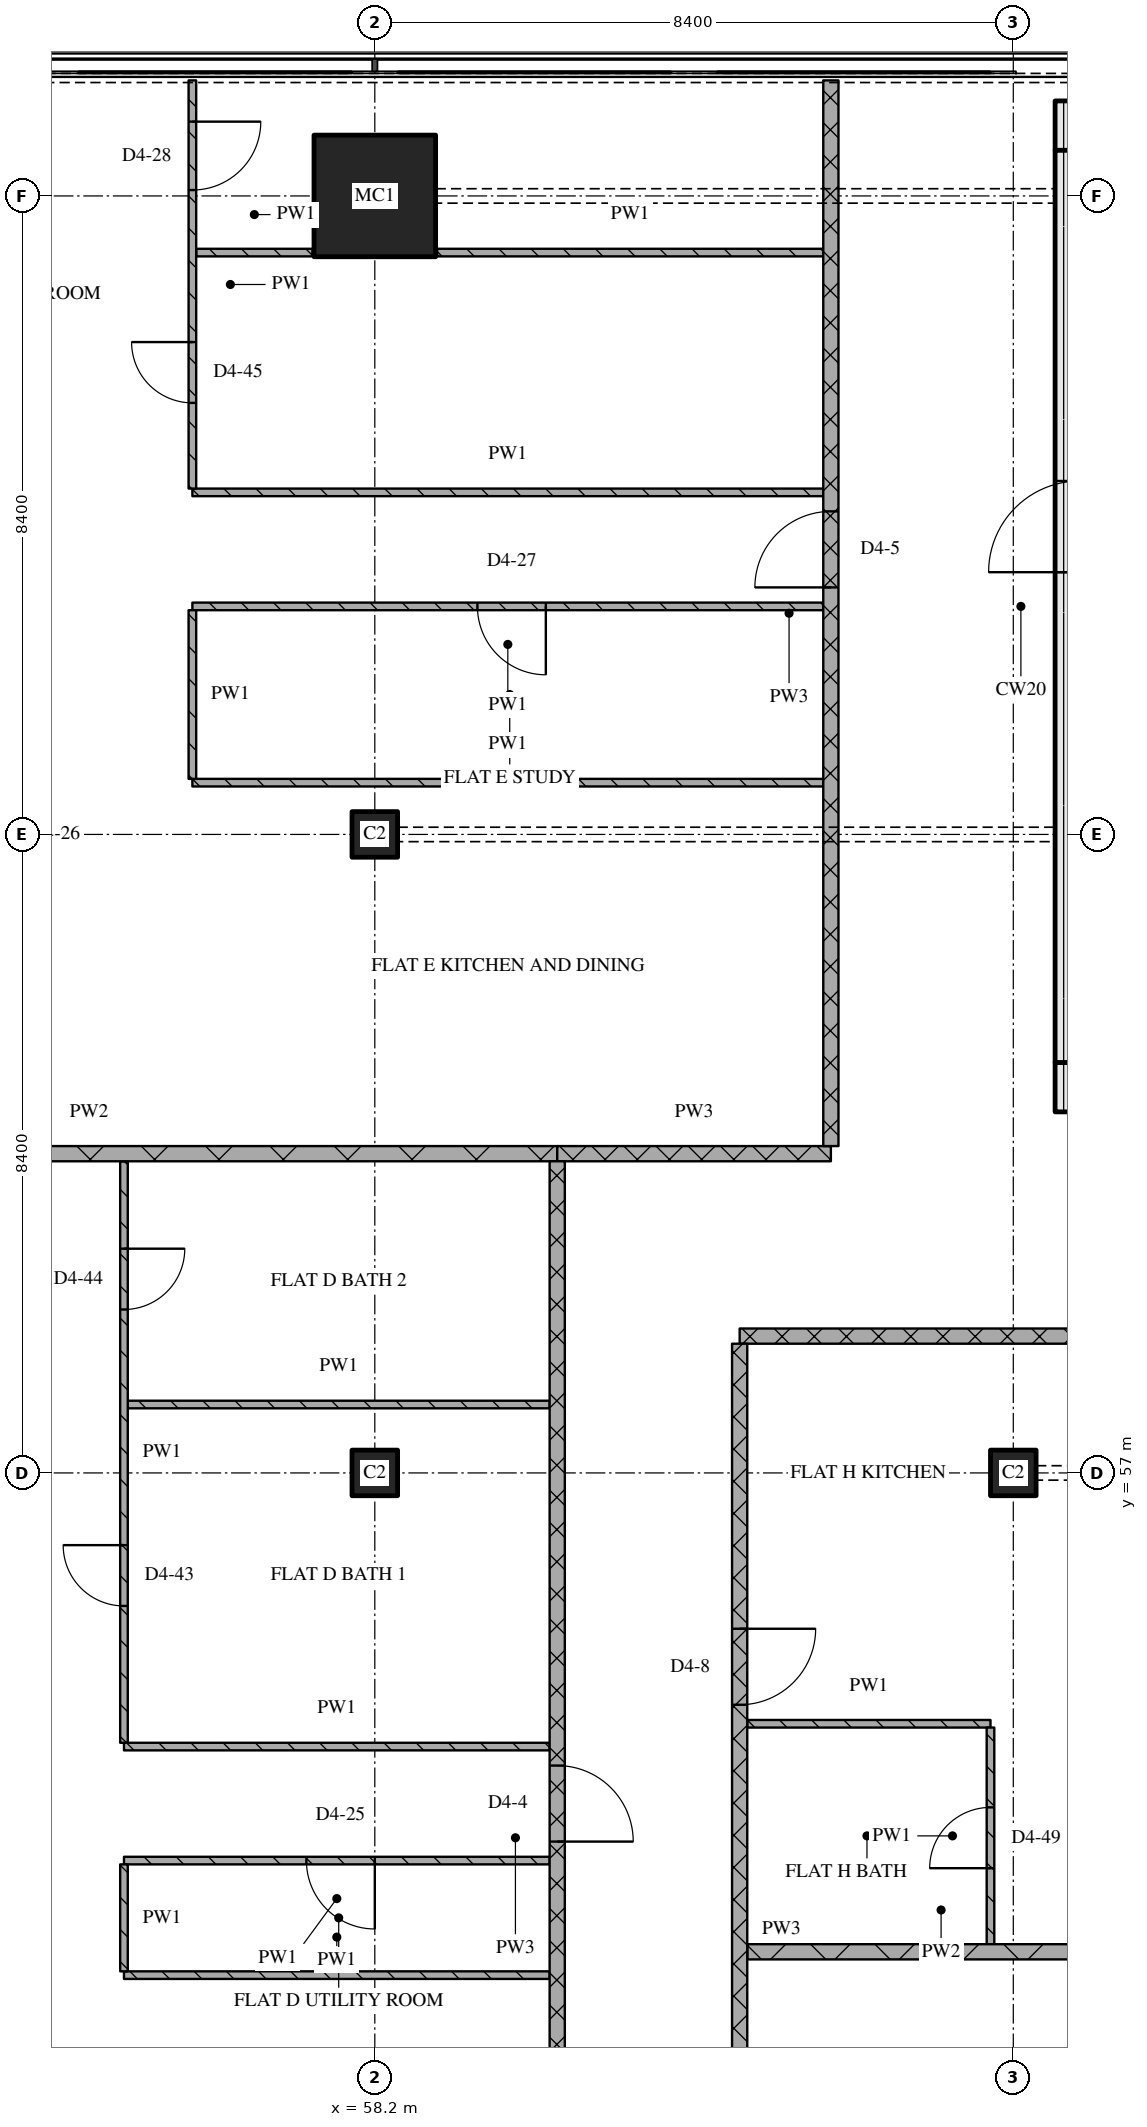
"""IFC4 building model, lengths in metres.
Left out: names, types, materials, properties, quantities, classifications, styles, units other than length and angle.
Written with IfcOpenShell. Run it as: python <this file> out.ifc"""

import sys

from ifc_helpers import new_model, si_unit, direction, frame, frame_2d, origin, origin_2d, place, context, subcontext, project, spatial, rectangle, extrude, element, fill, save


model = new_model("IFC4")
c1 = context("Model", 3, precision=1e-05, world=origin(), true_north=direction((0.0, 1.0)))
c2 = subcontext(c1, "Body", "Model", "MODEL_VIEW")
j1 = project(units=[si_unit("LENGTHUNIT", "METRE"), si_unit("PLANEANGLEUNIT", "RADIAN")], contexts=[c1])
p1 = place(None, origin())
s1 = spatial("IfcSite", under=j1, at=p1, CompositionType="ELEMENT")
p2 = place(p1, origin())
s2 = spatial("IfcBuilding", under=s1, at=p2, CompositionType="ELEMENT")
p3 = place(p2, frame((0.0, 0.0, 245.1)))
s3 = spatial("IfcBuildingStorey", under=s2, at=p3, CompositionType="ELEMENT", Elevation=245.1)
for number, where, z_axis, x_axis in (
    (1, (58.2, 57.0, 0.0), (0.0, 0.0, 1.0), (1.0, 0.0, 0.0)),
    (2, (58.2, 65.4, 0.0), (0.0, 0.0, 1.0), (1.0, 0.0, 0.0)),
):
    element("IfcColumn", number, at=place(p3, frame(where, z_axis=z_axis, x_axis=x_axis)), inside=s3, PredefinedType="COLUMN", context=c2, shape_type="SweptSolid", body=[
        extrude(rectangle(XDim=0.6, YDim=0.6, at=origin_2d()), origin(), (0.0, 0.0, 1.0), 3.6),
    ])
p4 = place(p3, frame((58.2, 73.8, 0.0), z_axis=(0.0, 0.0, 1.0), x_axis=(1.0, 0.0, 0.0)))
e3 = element("IfcColumn", 3, at=p4, inside=s3, PredefinedType="COLUMN", context=c2, shape_type="SweptSolid", body=[
    extrude(rectangle(XDim=1.6, YDim=1.6, at=origin_2d()), origin(), (0.0, 0.0, 1.0), 3.6),
])
p5 = place(p3, frame((66.6, 57.0, 0.0), z_axis=(0.0, 0.0, 1.0), x_axis=(1.0, 0.0, 0.0)))
e4 = element("IfcColumn", 4, at=p5, inside=s3, PredefinedType="COLUMN", context=c2, shape_type="SweptSolid", body=[
    extrude(rectangle(XDim=0.6, YDim=0.6, at=origin_2d()), origin(), (0.0, 0.0, 1.0), 3.6),
])
p6 = place(p3, frame((67.15, 62.075, 0.0), z_axis=(0.0, 0.0, 1.0), x_axis=(1.0, 0.0, 0.0)))
e5 = element("IfcWall", 5, at=p6, inside=s3, PredefinedType="SOLIDWALL", context=c2, shape_type="SweptSolid", body=[
    extrude(rectangle(XDim=40.9, YDim=0.65, at=frame_2d((20.45, 0.0))), origin(), (0.0, 0.0, 1.0), 3.32),
])
p7 = place(p6, frame((20.8, 0.0, 0.0)))
e6 = element("IfcOpeningElement", 6, at=p7, cuts=e5, PredefinedType="OPENING", context=c2, shape_type="SweptSolid", body=[
    extrude(rectangle(XDim=1.8, YDim=2.1, at=frame_2d((0.9, 1.05))), frame((0.0, 0.335, 0.0), z_axis=(0.0, -1.0, 0.0), x_axis=(1.0, 0.0, 0.0)), (0.0, 0.0, 1.0), 0.67),
])
p8 = place(p3, frame((67.15, 74.725, 0.0), z_axis=(0.0, 0.0, 1.0), x_axis=(1.0, 0.0, 0.0)))
e7 = element("IfcWall", 7, at=p8, inside=s3, PredefinedType="SOLIDWALL", context=c2, shape_type="SweptSolid", body=[
    extrude(rectangle(XDim=40.9, YDim=0.65, at=frame_2d((20.45, 0.0))), origin(), (0.0, 0.0, 1.0), 3.32),
])
p9 = place(p3, frame((67.475, 62.4, 0.0), z_axis=(0.0, 0.0, 1.0), x_axis=(0.0, 1.0, 0.0)))
e8 = element("IfcWall", 8, at=p9, inside=s3, PredefinedType="SOLIDWALL", context=c2, shape_type="SweptSolid", body=[
    extrude(rectangle(XDim=12.0, YDim=0.65, at=frame_2d((6.0, 0.0))), origin(), (0.0, 0.0, 1.0), 3.32),
])
p10 = place(p9, frame((6.45, 0.0, 0.0)))
e9 = element("IfcOpeningElement", 9, at=p10, cuts=e8, PredefinedType="OPENING", context=c2, shape_type="SweptSolid", body=[
    extrude(rectangle(XDim=1.2, YDim=2.1, at=frame_2d((0.6, 1.05))), frame((0.0, 0.335, 0.0), z_axis=(0.0, -1.0, 0.0), x_axis=(1.0, 0.0, 0.0)), (0.0, 0.0, 1.0), 0.67),
])
p11 = place(p3, frame((54.9, 50.393, 0.0), z_axis=(0.0, 0.0, 1.0), x_axis=(1.0, 0.0, 0.0)))
e10 = element("IfcWall", 10, at=p11, inside=s3, PredefinedType="PARTITIONING", context=c2, shape_type="SweptSolid", body=[
    extrude(rectangle(XDim=5.6, YDim=0.1, at=frame_2d((2.8, 0.0))), origin(), (0.0, 0.0, 1.0), 3.32),
])
p12 = place(p3, frame((63.1, 50.7, 0.0), z_axis=(0.0, 0.0, 1.0), x_axis=(1.0, 0.0, 0.0)))
e11 = element("IfcWall", 11, at=p12, inside=s3, PredefinedType="PARTITIONING", context=c2, shape_type="SweptSolid", body=[
    extrude(rectangle(XDim=5.1, YDim=0.2, at=frame_2d((2.55, 0.0))), origin(), (0.0, 0.0, 1.0), 3.32),
])
p13 = place(p3, frame((60.5, 51.9, 0.0), z_axis=(0.0, 0.0, 1.0), x_axis=(-1.0, 0.0, 0.0)))
e12 = element("IfcWall", 12, at=p13, inside=s3, PredefinedType="PARTITIONING", context=c2, shape_type="SweptSolid", body=[
    extrude(rectangle(XDim=5.6, YDim=0.1, at=frame_2d((2.8, 0.0))), origin(), (0.0, 0.0, 1.0), 3.32),
])
p14 = place(p13, frame((2.3, 0.0, 0.0)))
e13 = element("IfcOpeningElement", 13, at=p14, cuts=e12, PredefinedType="OPENING", context=c2, shape_type="SweptSolid", body=[
    extrude(rectangle(XDim=0.9, YDim=2.1, at=frame_2d((0.45, 1.05))), frame((0.0, 0.06, 0.0), z_axis=(0.0, -1.0, 0.0), x_axis=(1.0, 0.0, 0.0)), (0.0, 0.0, 1.0), 0.12),
])
p15 = place(p3, frame((54.9, 53.4, 0.0), z_axis=(0.0, 0.0, 1.0), x_axis=(1.0, 0.0, 0.0)))
e14 = element("IfcWall", 14, at=p15, inside=s3, PredefinedType="PARTITIONING", context=c2, shape_type="SweptSolid", body=[
    extrude(rectangle(XDim=5.6, YDim=0.1, at=frame_2d((2.8, 0.0))), origin(), (0.0, 0.0, 1.0), 3.32),
])
p16 = place(p3, frame((63.1, 53.7, 0.0), z_axis=(0.0, 0.0, 1.0), x_axis=(1.0, 0.0, 0.0)))
e15 = element("IfcWall", 15, at=p16, inside=s3, PredefinedType="PARTITIONING", context=c2, shape_type="SweptSolid", body=[
    extrude(rectangle(XDim=3.2, YDim=0.1, at=frame_2d((1.6, 0.0))), origin(), (0.0, 0.0, 1.0), 3.32),
])
p17 = place(p3, frame((54.95, 57.9, 0.0), z_axis=(0.0, 0.0, 1.0), x_axis=(1.0, 0.0, 0.0)))
e16 = element("IfcWall", 16, at=p17, inside=s3, PredefinedType="PARTITIONING", context=c2, shape_type="SweptSolid", body=[
    extrude(rectangle(XDim=5.55, YDim=0.1, at=frame_2d((2.775, 0.0))), origin(), (0.0, 0.0, 1.0), 3.32),
])
p18 = place(p3, frame((63.0, 58.8, 0.0), z_axis=(0.0, 0.0, 1.0), x_axis=(1.0, 0.0, 0.0)))
e17 = element("IfcWall", 17, at=p18, inside=s3, PredefinedType="PARTITIONING", context=c2, shape_type="SweptSolid", body=[
    extrude(rectangle(XDim=10.8, YDim=0.2, at=frame_2d((5.4, 0.0))), origin(), (0.0, 0.0, 1.0), 3.32),
])
p19 = place(p3, frame((60.6, 61.2, 0.0), z_axis=(0.0, 0.0, 1.0), x_axis=(1.0, 0.0, 0.0)))
e18 = element("IfcWall", 18, at=p19, inside=s3, PredefinedType="PARTITIONING", context=c2, shape_type="SweptSolid", body=[
    extrude(rectangle(XDim=3.6, YDim=0.2, at=frame_2d((1.8, 0.0))), origin(), (0.0, 0.0, 1.0), 3.32),
])
p20 = place(p3, frame((48.28, 61.2, 0.0), z_axis=(0.0, 0.0, 1.0), x_axis=(1.0, 0.0, 0.0)))
e19 = element("IfcWall", 19, at=p20, inside=s3, PredefinedType="PARTITIONING", context=c2, shape_type="SweptSolid", body=[
    extrude(rectangle(XDim=12.32, YDim=0.2, at=frame_2d((6.16, 0.0))), origin(), (0.0, 0.0, 1.0), 3.32),
])
p21 = place(p3, frame((55.8, 66.081, 0.0), z_axis=(0.0, 0.0, 1.0), x_axis=(1.0, 0.0, 0.0)))
e20 = element("IfcWall", 20, at=p21, inside=s3, PredefinedType="PARTITIONING", context=c2, shape_type="SweptSolid", body=[
    extrude(rectangle(XDim=8.3, YDim=0.1, at=frame_2d((4.15, 0.0))), origin(), (0.0, 0.0, 1.0), 3.32),
])
p22 = place(p3, frame((64.1, 68.4, 0.0), z_axis=(0.0, 0.0, 1.0), x_axis=(-1.0, 0.0, 0.0)))
e21 = element("IfcWall", 21, at=p22, inside=s3, PredefinedType="PARTITIONING", context=c2, shape_type="SweptSolid", body=[
    extrude(rectangle(XDim=8.3, YDim=0.1, at=frame_2d((4.15, 0.0))), origin(), (0.0, 0.0, 1.0), 3.32),
])
p23 = place(p22, frame((3.65, 0.0, 0.0)))
e22 = element("IfcOpeningElement", 22, at=p23, cuts=e21, PredefinedType="OPENING", context=c2, shape_type="SweptSolid", body=[
    extrude(rectangle(XDim=0.9, YDim=2.1, at=frame_2d((0.45, 1.05))), frame((0.0, 0.06, 0.0), z_axis=(0.0, -1.0, 0.0), x_axis=(1.0, 0.0, 0.0)), (0.0, 0.0, 1.0), 0.12),
])
p24 = place(p3, frame((55.8, 69.9, 0.0), z_axis=(0.0, 0.0, 1.0), x_axis=(1.0, 0.0, 0.0)))
e23 = element("IfcWall", 23, at=p24, inside=s3, PredefinedType="PARTITIONING", context=c2, shape_type="SweptSolid", body=[
    extrude(rectangle(XDim=8.3, YDim=0.1, at=frame_2d((4.15, 0.0))), origin(), (0.0, 0.0, 1.0), 3.32),
])
p25 = place(p3, frame((55.85, 73.055, 0.0), z_axis=(0.0, 0.0, 1.0), x_axis=(1.0, 0.0, 0.0)))
e24 = element("IfcWall", 24, at=p25, inside=s3, PredefinedType="PARTITIONING", context=c2, shape_type="SweptSolid", body=[
    extrude(rectangle(XDim=1.53, YDim=0.1, at=frame_2d((0.765, 0.0))), origin(), (0.0, 0.0, 1.0), 3.32),
])
p26 = place(p3, frame((59.02, 73.055, 0.0), z_axis=(0.0, 0.0, 1.0), x_axis=(1.0, 0.0, 0.0)))
e25 = element("IfcWall", 25, at=p26, inside=s3, PredefinedType="PARTITIONING", context=c2, shape_type="SweptSolid", body=[
    extrude(rectangle(XDim=5.08, YDim=0.1, at=frame_2d((2.54, 0.0))), origin(), (0.0, 0.0, 1.0), 3.32),
])
p27 = place(p3, frame((54.9, 51.85, 0.0), z_axis=(0.0, 0.0, 1.0), x_axis=(0.0, -1.0, 0.0)))
e26 = element("IfcWall", 26, at=p27, inside=s3, PredefinedType="PARTITIONING", context=c2, shape_type="SweptSolid", body=[
    extrude(rectangle(XDim=1.407, YDim=0.1, at=frame_2d((0.704, 0.0))), origin(), (0.0, 0.0, 1.0), 3.32),
])
p28 = place(p3, frame((54.9, 61.1, 0.0), z_axis=(0.0, 0.0, 1.0), x_axis=(0.0, -1.0, 0.0)))
e27 = element("IfcWall", 27, at=p28, inside=s3, PredefinedType="PARTITIONING", context=c2, shape_type="SweptSolid", body=[
    extrude(rectangle(XDim=7.65, YDim=0.1, at=frame_2d((3.825, 0.0))), origin(), (0.0, 0.0, 1.0), 3.32),
])
p29 = place(p28, frame((1.15, 0.0, 0.0)))
e28 = element("IfcOpeningElement", 28, at=p29, cuts=e27, PredefinedType="OPENING", context=c2, shape_type="SweptSolid", body=[
    extrude(rectangle(XDim=0.8, YDim=2.1, at=frame_2d((0.4, 1.05))), frame((0.0, 0.06, 0.0), z_axis=(0.0, -1.0, 0.0), x_axis=(1.0, 0.0, 0.0)), (0.0, 0.0, 1.0), 0.12),
])
p30 = place(p28, frame((5.05, 0.0, 0.0)))
e29 = element("IfcOpeningElement", 29, at=p30, cuts=e27, PredefinedType="OPENING", context=c2, shape_type="SweptSolid", body=[
    extrude(rectangle(XDim=0.8, YDim=2.1, at=frame_2d((0.4, 1.05))), frame((0.0, 0.06, 0.0), z_axis=(0.0, -1.0, 0.0), x_axis=(1.0, 0.0, 0.0)), (0.0, 0.0, 1.0), 0.12),
])
p31 = place(p3, frame((55.8, 68.35, 0.0), z_axis=(0.0, 0.0, 1.0), x_axis=(0.0, -1.0, 0.0)))
e30 = element("IfcWall", 30, at=p31, inside=s3, PredefinedType="PARTITIONING", context=c2, shape_type="SweptSolid", body=[
    extrude(rectangle(XDim=2.219, YDim=0.1, at=frame_2d((1.109, 0.0))), origin(), (0.0, 0.0, 1.0), 3.32),
])
p32 = place(p3, frame((55.8, 75.32, 0.0), z_axis=(0.0, 0.0, 1.0), x_axis=(0.0, -1.0, 0.0)))
e31 = element("IfcWall", 31, at=p32, inside=s3, PredefinedType="PARTITIONING", context=c2, shape_type="SweptSolid", body=[
    extrude(rectangle(XDim=5.37, YDim=0.1, at=frame_2d((2.685, 0.0))), origin(), (0.0, 0.0, 1.0), 3.32),
])
p33 = place(p32, frame((0.542, 0.0, 0.0)))
e32 = element("IfcOpeningElement", 32, at=p33, cuts=e31, PredefinedType="OPENING", context=c2, shape_type="SweptSolid", body=[
    extrude(rectangle(XDim=0.9, YDim=2.1, at=frame_2d((0.45, 1.05))), frame((0.0, 0.06, 0.0), z_axis=(0.0, -1.0, 0.0), x_axis=(1.0, 0.0, 0.0)), (0.0, 0.0, 1.0), 0.12),
])
p34 = place(p32, frame((3.443, 0.0, 0.0)))
e33 = element("IfcOpeningElement", 33, at=p34, cuts=e31, PredefinedType="OPENING", context=c2, shape_type="SweptSolid", body=[
    extrude(rectangle(XDim=0.8, YDim=2.1, at=frame_2d((0.4, 1.05))), frame((0.0, 0.06, 0.0), z_axis=(0.0, -1.0, 0.0), x_axis=(1.0, 0.0, 0.0)), (0.0, 0.0, 1.0), 0.12),
])
p35 = place(p3, frame((60.6, 43.3, 0.0), z_axis=(0.0, 0.0, 1.0), x_axis=(0.0, 1.0, 0.0)))
e34 = element("IfcWall", 34, at=p35, inside=s3, PredefinedType="PARTITIONING", context=c2, shape_type="SweptSolid", body=[
    extrude(rectangle(XDim=17.8, YDim=0.2, at=frame_2d((8.9, 0.0))), origin(), (0.0, 0.0, 1.0), 3.32),
])
p36 = place(p35, frame((8.85, 0.0, 0.0)))
e35 = element("IfcOpeningElement", 35, at=p36, cuts=e34, PredefinedType="OPENING", context=c2, shape_type="SweptSolid", body=[
    extrude(rectangle(XDim=1.0, YDim=2.1, at=frame_2d((0.5, 1.05))), frame((0.0, 0.11, 0.0), z_axis=(0.0, -1.0, 0.0), x_axis=(1.0, 0.0, 0.0)), (0.0, 0.0, 1.0), 0.22),
])
p37 = place(p3, frame((63.0, 58.7, 0.0), z_axis=(0.0, 0.0, 1.0), x_axis=(0.0, -1.0, 0.0)))
e36 = element("IfcWall", 36, at=p37, inside=s3, PredefinedType="PARTITIONING", context=c2, shape_type="SweptSolid", body=[
    extrude(rectangle(XDim=15.4, YDim=0.2, at=frame_2d((7.7, 0.0))), origin(), (0.0, 0.0, 1.0), 3.32),
])
p38 = place(p37, frame((3.75, 0.0, 0.0)))
e37 = element("IfcOpeningElement", 37, at=p38, cuts=e36, PredefinedType="OPENING", context=c2, shape_type="SweptSolid", body=[
    extrude(rectangle(XDim=1.0, YDim=2.1, at=frame_2d((0.5, 1.05))), frame((0.0, 0.11, 0.0), z_axis=(0.0, -1.0, 0.0), x_axis=(1.0, 0.0, 0.0)), (0.0, 0.0, 1.0), 0.22),
])
p39 = place(p37, frame((11.25, 0.0, 0.0)))
e38 = element("IfcOpeningElement", 38, at=p39, cuts=e36, PredefinedType="OPENING", context=c2, shape_type="SweptSolid", body=[
    extrude(rectangle(XDim=0.9, YDim=2.1, at=frame_2d((0.45, 1.05))), frame((0.0, 0.11, 0.0), z_axis=(0.0, -1.0, 0.0), x_axis=(1.0, 0.0, 0.0)), (0.0, 0.0, 1.0), 0.22),
])
p40 = place(p3, frame((64.2, 61.3, 0.0), z_axis=(0.0, 0.0, 1.0), x_axis=(0.0, 1.0, 0.0)))
e39 = element("IfcWall", 39, at=p40, inside=s3, PredefinedType="PARTITIONING", context=c2, shape_type="SweptSolid", body=[
    extrude(rectangle(XDim=14.02, YDim=0.2, at=frame_2d((7.01, 0.0))), origin(), (0.0, 0.0, 1.0), 3.32),
])
p41 = place(p40, frame((7.35, 0.0, 0.0)))
e40 = element("IfcOpeningElement", 40, at=p41, cuts=e39, PredefinedType="OPENING", context=c2, shape_type="SweptSolid", body=[
    extrude(rectangle(XDim=1.0, YDim=2.1, at=frame_2d((0.5, 1.05))), frame((0.0, 0.11, 0.0), z_axis=(0.0, -1.0, 0.0), x_axis=(1.0, 0.0, 0.0)), (0.0, 0.0, 1.0), 0.22),
])
p42 = place(p3, frame((66.3, 50.8, 0.0), z_axis=(0.0, 0.0, 1.0), x_axis=(0.0, 1.0, 0.0)))
e41 = element("IfcWall", 41, at=p42, inside=s3, PredefinedType="PARTITIONING", context=c2, shape_type="SweptSolid", body=[
    extrude(rectangle(XDim=2.85, YDim=0.1, at=frame_2d((1.425, 0.0))), origin(), (0.0, 0.0, 1.0), 3.32),
])
p43 = place(p42, frame((1.0, 0.0, 0.0)))
e42 = element("IfcOpeningElement", 42, at=p43, cuts=e41, PredefinedType="OPENING", context=c2, shape_type="SweptSolid", body=[
    extrude(rectangle(XDim=0.8, YDim=2.1, at=frame_2d((0.4, 1.05))), frame((0.0, 0.06, 0.0), z_axis=(0.0, -1.0, 0.0), x_axis=(1.0, 0.0, 0.0)), (0.0, 0.0, 1.0), 0.12),
])
p44 = place(p14, origin())
e43 = element("IfcDoor", 43, at=p44, inside=s3, OperationType="SINGLE_SWING_LEFT", PredefinedType="DOOR", context=c2, shape_type="SweptSolid", body=[
    extrude(rectangle(XDim=0.9, YDim=2.1, at=frame_2d((0.45, 1.05))), frame((0.0, 0.025, 0.0), z_axis=(0.0, -1.0, 0.0), x_axis=(1.0, 0.0, 0.0)), (0.0, 0.0, 1.0), 0.05),
])
fill(e13, e43)
p45 = place(p23, origin())
e44 = element("IfcDoor", 44, at=p45, inside=s3, OperationType="SINGLE_SWING_LEFT", PredefinedType="DOOR", context=c2, shape_type="SweptSolid", body=[
    extrude(rectangle(XDim=0.9, YDim=2.1, at=frame_2d((0.45, 1.05))), frame((0.0, 0.025, 0.0), z_axis=(0.0, -1.0, 0.0), x_axis=(1.0, 0.0, 0.0)), (0.0, 0.0, 1.0), 0.05),
])
fill(e22, e44)
p46 = place(p29, origin())
e45 = element("IfcDoor", 45, at=p46, inside=s3, OperationType="SINGLE_SWING_LEFT", PredefinedType="DOOR", context=c2, shape_type="SweptSolid", body=[
    extrude(rectangle(XDim=0.8, YDim=2.1, at=frame_2d((0.4, 1.05))), frame((0.0, 0.025, 0.0), z_axis=(0.0, -1.0, 0.0), x_axis=(1.0, 0.0, 0.0)), (0.0, 0.0, 1.0), 0.05),
])
fill(e28, e45)
p47 = place(p30, origin())
e46 = element("IfcDoor", 46, at=p47, inside=s3, OperationType="SINGLE_SWING_RIGHT", PredefinedType="DOOR", context=c2, shape_type="SweptSolid", body=[
    extrude(rectangle(XDim=0.8, YDim=2.1, at=frame_2d((0.4, 1.05))), frame((0.0, 0.025, 0.0), z_axis=(0.0, -1.0, 0.0), x_axis=(1.0, 0.0, 0.0)), (0.0, 0.0, 1.0), 0.05),
])
fill(e29, e46)
p48 = place(p33, origin())
e47 = element("IfcDoor", 47, at=p48, inside=s3, OperationType="SINGLE_SWING_LEFT", PredefinedType="DOOR", context=c2, shape_type="SweptSolid", body=[
    extrude(rectangle(XDim=0.9, YDim=2.1, at=frame_2d((0.45, 1.05))), frame((0.0, 0.025, 0.0), z_axis=(0.0, -1.0, 0.0), x_axis=(1.0, 0.0, 0.0)), (0.0, 0.0, 1.0), 0.05),
])
fill(e32, e47)
p49 = place(p34, origin())
e48 = element("IfcDoor", 48, at=p49, inside=s3, OperationType="SINGLE_SWING_RIGHT", PredefinedType="DOOR", context=c2, shape_type="SweptSolid", body=[
    extrude(rectangle(XDim=0.8, YDim=2.1, at=frame_2d((0.4, 1.05))), frame((0.0, 0.025, 0.0), z_axis=(0.0, -1.0, 0.0), x_axis=(1.0, 0.0, 0.0)), (0.0, 0.0, 1.0), 0.05),
])
fill(e33, e48)
p50 = place(p36, origin())
e49 = element("IfcDoor", 49, at=p50, inside=s3, OperationType="SINGLE_SWING_RIGHT", PredefinedType="DOOR", context=c2, shape_type="SweptSolid", body=[
    extrude(rectangle(XDim=1.0, YDim=2.1, at=frame_2d((0.5, 1.05))), frame((0.0, 0.025, 0.0), z_axis=(0.0, -1.0, 0.0), x_axis=(1.0, 0.0, 0.0)), (0.0, 0.0, 1.0), 0.05),
])
fill(e35, e49)
p51 = place(p38, origin())
e50 = element("IfcDoor", 50, at=p51, inside=s3, OperationType="SINGLE_SWING_LEFT", PredefinedType="DOOR", context=c2, shape_type="SweptSolid", body=[
    extrude(rectangle(XDim=1.0, YDim=2.1, at=frame_2d((0.5, 1.05))), frame((0.0, 0.025, 0.0), z_axis=(0.0, -1.0, 0.0), x_axis=(1.0, 0.0, 0.0)), (0.0, 0.0, 1.0), 0.05),
])
fill(e37, e50)
p52 = place(p41, origin())
e51 = element("IfcDoor", 51, at=p52, inside=s3, OperationType="SINGLE_SWING_LEFT", PredefinedType="DOOR", context=c2, shape_type="SweptSolid", body=[
    extrude(rectangle(XDim=1.0, YDim=2.1, at=frame_2d((0.5, 1.05))), frame((0.0, 0.025, 0.0), z_axis=(0.0, -1.0, 0.0), x_axis=(1.0, 0.0, 0.0)), (0.0, 0.0, 1.0), 0.05),
])
fill(e40, e51)
p53 = place(p43, origin())
e52 = element("IfcDoor", 52, at=p53, inside=s3, OperationType="SINGLE_SWING_LEFT", PredefinedType="DOOR", context=c2, shape_type="SweptSolid", body=[
    extrude(rectangle(XDim=0.8, YDim=2.1, at=frame_2d((0.4, 1.05))), frame((0.0, 0.025, 0.0), z_axis=(0.0, -1.0, 0.0), x_axis=(1.0, 0.0, 0.0)), (0.0, 0.0, 1.0), 0.05),
])
fill(e42, e52)
save(model, sys.argv[1])
